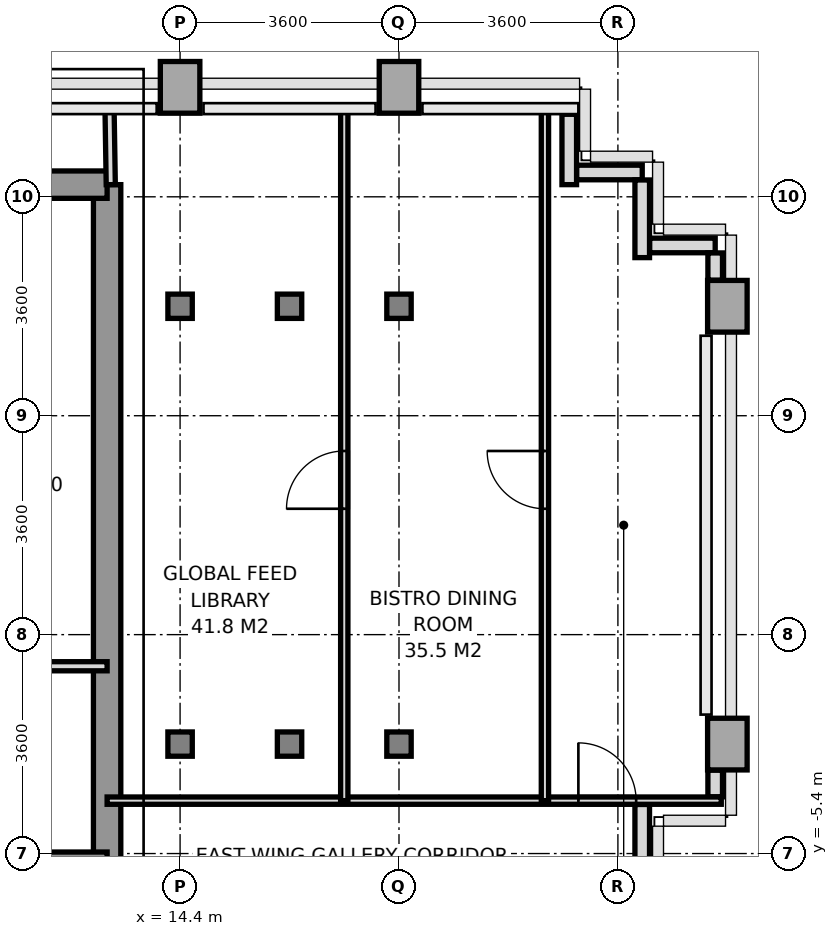
"""IFC4 building model, lengths in metres.
Left out: names, types, materials, properties, quantities, classifications, styles, units other than length and angle.
Written with IfcOpenShell. Run it as: python <this file> out.ifc"""

import sys

from ifc_helpers import new_model, si_unit, direction, frame, frame_2d, origin, origin_2d, place, context, subcontext, project, spatial, rectangle, i_section, extrude, source, transform, mapped, element, fill, save


model = new_model("IFC4")
c1 = context("Model", 3, precision=1e-05, world=origin(), true_north=direction((0.0, 1.0)))
c2 = subcontext(c1, "Body", "Model", "MODEL_VIEW")
j1 = project(units=[si_unit("LENGTHUNIT", "METRE"), si_unit("PLANEANGLEUNIT", "RADIAN")], contexts=[c1])
p1 = place(None, origin())
s1 = spatial("IfcSite", under=j1, at=p1, CompositionType="ELEMENT")
p2 = place(p1, origin())
s2 = spatial("IfcBuilding", under=s1, at=p2, CompositionType="ELEMENT")
p3 = place(p2, frame((0.0, 0.0, 124.4)))
s3 = spatial("IfcBuildingStorey", under=s2, at=p3, CompositionType="ELEMENT", Elevation=124.4)
m1 = source(origin(), c2, "Body", "SweptSolid", [
    extrude(i_section(OverallWidth=0.401, OverallDepth=0.399, WebThickness=0.02, FlangeThickness=0.032, at=origin_2d()), origin(), (0.0, 0.0, 1.0), 3.2),
])
for number, where, z_axis, x_axis in (
    (1, (14.4, -3.6, 0.0), (0.0, 0.0, 1.0), (1.0, 0.0, 0.0)),
    (2, (14.4, 3.6, 0.0), (0.0, 0.0, 1.0), (1.0, 0.0, 0.0)),
):
    element("IfcColumn", number, at=place(p3, frame(where, z_axis=z_axis, x_axis=x_axis)), inside=s3, PredefinedType="COLUMN", context=c2, shape_type="MappedRepresentation", body=[
        mapped(m1, transform((0.0, 0.0, 0.0), x_axis=(1.0, 0.0, 0.0), y_axis=(0.0, 1.0, 0.0), z_axis=(0.0, 0.0, 1.0), scale=1.0)),
    ])
m2 = source(origin(), c2, "Body", "SweptSolid", [
    extrude(rectangle(XDim=0.65, YDim=0.85, at=origin_2d()), origin(), (0.0, 0.0, 1.0), 3.2),
])
p4 = place(p3, frame((14.4, 7.2, 0.0), z_axis=(0.0, 0.0, 1.0), x_axis=(1.0, 0.0, 0.0)))
e3 = element("IfcColumn", 3, at=p4, inside=s3, PredefinedType="COLUMN", context=c2, shape_type="MappedRepresentation", body=[
    mapped(m2, transform((0.0, 0.0, 0.0), x_axis=(1.0, 0.0, 0.0), y_axis=(0.0, 1.0, 0.0), z_axis=(0.0, 0.0, 1.0), scale=1.0)),
])
for number, where, z_axis, x_axis in (
    (4, (16.2, -3.6, 0.0), (0.0, 0.0, 1.0), (1.0, 0.0, 0.0)),
    (5, (16.2, 3.6, 0.0), (0.0, 0.0, 1.0), (1.0, 0.0, 0.0)),
    (6, (18.0, -3.6, 0.0), (0.0, 0.0, 1.0), (1.0, 0.0, 0.0)),
    (7, (18.0, 3.6, 0.0), (0.0, 0.0, 1.0), (1.0, 0.0, 0.0)),
):
    element("IfcColumn", number, at=place(p3, frame(where, z_axis=z_axis, x_axis=x_axis)), inside=s3, PredefinedType="COLUMN", context=c2, shape_type="MappedRepresentation", body=[
        mapped(m1, transform((0.0, 0.0, 0.0), x_axis=(1.0, 0.0, 0.0), y_axis=(0.0, 1.0, 0.0), z_axis=(0.0, 0.0, 1.0), scale=1.0)),
    ])
for number, where, z_axis, x_axis in (
    (8, (18.0, 7.2, 0.0), (0.0, 0.0, 1.0), (1.0, 0.0, 0.0)),
    (9, (23.4, -3.6, 0.0), (0.0, 0.0, 1.0), (1.0, 0.0, 0.0)),
    (10, (23.4, 3.6, 0.0), (0.0, 0.0, 1.0), (1.0, 0.0, 0.0)),
):
    element("IfcColumn", number, at=place(p3, frame(where, z_axis=z_axis, x_axis=x_axis)), inside=s3, PredefinedType="COLUMN", context=c2, shape_type="MappedRepresentation", body=[
        mapped(m2, transform((0.0, 0.0, 0.0), x_axis=(1.0, 0.0, 0.0), y_axis=(0.0, 1.0, 0.0), z_axis=(0.0, 0.0, 1.0), scale=1.0)),
    ])
p5 = place(p3, frame((22.0, -4.593, 0.0), z_axis=(0.0, 0.0, 1.0), x_axis=(0.0, -1.0, 0.0)))
e11 = element("IfcWall", 11, at=p5, inside=s3, PredefinedType="PARAPET", context=c2, shape_type="SweptSolid", body=[
    extrude(rectangle(XDim=1.207, YDim=0.24, at=frame_2d((0.604, 0.0))), origin(), (0.0, 0.0, 1.0), 1.15),
])
p6 = place(p3, frame((20.8, 6.757, 0.0), z_axis=(0.0, 0.0, 1.0), x_axis=(0.0, -1.0, 0.0)))
e12 = element("IfcWall", 12, at=p6, inside=s3, PredefinedType="PARAPET", context=c2, shape_type="SweptSolid", body=[
    extrude(rectangle(XDim=1.157, YDim=0.24, at=frame_2d((0.579, 0.0))), origin(), (0.0, 0.0, 1.0), 1.15),
])
p7 = place(p3, frame((20.923, 5.8, 0.0), z_axis=(0.0, 0.0, 1.0), x_axis=(1.0, 0.0, 0.0)))
e13 = element("IfcWall", 13, at=p7, inside=s3, PredefinedType="PARAPET", context=c2, shape_type="SweptSolid", body=[
    extrude(rectangle(XDim=1.077, YDim=0.24, at=frame_2d((0.539, 0.0))), origin(), (0.0, 0.0, 1.0), 1.15),
])
p8 = place(p3, frame((22.0, 5.677, 0.0), z_axis=(0.0, 0.0, 1.0), x_axis=(0.0, -1.0, 0.0)))
e14 = element("IfcWall", 14, at=p8, inside=s3, PredefinedType="PARAPET", context=c2, shape_type="SweptSolid", body=[
    extrude(rectangle(XDim=1.277, YDim=0.24, at=frame_2d((0.639, 0.0))), origin(), (0.0, 0.0, 1.0), 1.15),
])
p9 = place(p3, frame((22.123, 4.6, 0.0), z_axis=(0.0, 0.0, 1.0), x_axis=(1.0, 0.0, 0.0)))
e15 = element("IfcWall", 15, at=p9, inside=s3, PredefinedType="PARAPET", context=c2, shape_type="SweptSolid", body=[
    extrude(rectangle(XDim=1.077, YDim=0.24, at=frame_2d((0.539, 0.0))), origin(), (0.0, 0.0, 1.0), 1.15),
])
p10 = place(p3, frame((23.2, 4.477, 0.0), z_axis=(0.0, 0.0, 1.0), x_axis=(0.0, -1.0, 0.0)))
e16 = element("IfcWall", 16, at=p10, inside=s3, PredefinedType="PARAPET", context=c2, shape_type="SweptSolid", body=[
    extrude(rectangle(XDim=0.449, YDim=0.24, at=frame_2d((0.225, 0.0))), origin(), (0.0, 0.0, 1.0), 1.15),
])
p11 = place(p3, frame((23.2, -4.028, 0.0), z_axis=(0.0, 0.0, 1.0), x_axis=(0.0, -1.0, 0.0)))
e17 = element("IfcWall", 17, at=p11, inside=s3, PredefinedType="PARAPET", context=c2, shape_type="SweptSolid", body=[
    extrude(rectangle(XDim=0.439, YDim=0.24, at=frame_2d((0.219, 0.0))), origin(), (0.0, 0.0, 1.0), 1.15),
])
p12 = place(p3, frame((13.2, -5.6, 0.0), z_axis=(0.0, 0.0, 1.0), x_axis=(0.0, 1.0, 0.0)))
e18 = element("IfcWall", 18, at=p12, inside=s3, PredefinedType="SHEAR", context=c2, shape_type="SweptSolid", body=[
    extrude(rectangle(XDim=11.2, YDim=0.45, at=frame_2d((5.6, 0.0))), origin(), (0.0, 0.0, 1.0), 3.2),
])
p13 = place(p3, frame((11.381, 5.6, 0.0), z_axis=(0.0, 0.0, 1.0), x_axis=(1.0, 0.0, 0.0)))
e19 = element("IfcWall", 19, at=p13, inside=s3, PredefinedType="SHEAR", context=c2, shape_type="SweptSolid", body=[
    extrude(rectangle(XDim=1.819, YDim=0.45, at=frame_2d((0.909, 0.0))), origin(), (0.0, 0.0, 1.0), 3.2),
])
p14 = place(p3, frame((5.4, -5.6, 0.0), z_axis=(0.0, 0.0, 1.0), x_axis=(1.0, 0.0, 0.0)))
e20 = element("IfcWall", 20, at=p14, inside=s3, PredefinedType="SHEAR", context=c2, shape_type="SweptSolid", body=[
    extrude(rectangle(XDim=7.8, YDim=0.45, at=frame_2d((3.9, 0.0))), origin(), (0.0, 0.0, 1.0), 3.2),
])
p15 = place(p14, frame((3.0, 0.0, 0.0)))
e21 = element("IfcOpeningElement", 21, at=p15, cuts=e20, PredefinedType="OPENING", context=c2, shape_type="SweptSolid", body=[
    extrude(rectangle(XDim=1.2, YDim=2.2, at=frame_2d((0.6, 1.1))), frame((0.0, 0.235, 0.0), z_axis=(0.0, -1.0, 0.0), x_axis=(1.0, 0.0, 0.0)), (0.0, 0.0, 1.0), 0.47),
])
p16 = place(p14, frame((5.85, 0.0, 0.0)))
e22 = element("IfcOpeningElement", 22, at=p16, cuts=e20, PredefinedType="OPENING", context=c2, shape_type="SweptSolid", body=[
    extrude(rectangle(XDim=0.8, YDim=2.1, at=frame_2d((0.4, 1.05))), frame((0.0, 0.235, 0.0), z_axis=(0.0, -1.0, 0.0), x_axis=(1.0, 0.0, 0.0)), (0.0, 0.0, 1.0), 0.47),
])
p17 = place(p3, frame((11.02, -2.32, 0.0), z_axis=(0.0, 0.0, 1.0), x_axis=(1.0, 0.0, 0.0)))
e23 = element("IfcWall", 23, at=p17, inside=s3, PredefinedType="PARTITIONING", context=c2, shape_type="SweptSolid", body=[
    extrude(rectangle(XDim=2.18, YDim=0.15, at=frame_2d((1.09, 0.0))), origin(), (0.0, 0.0, 1.0), 3.2),
])
p18 = place(p3, frame((13.26, 5.6, 0.0), z_axis=(0.0, 0.0, 1.0), x_axis=(-0.016013571389, 0.999871774545, 0.0)))
e24 = element("IfcWall", 24, at=p18, inside=s3, PredefinedType="PARTITIONING", context=c2, shape_type="SweptSolid", body=[
    extrude(rectangle(XDim=1.25, YDim=0.15, at=frame_2d((0.625, 0.0))), origin(), (0.0, 0.0, 1.0), 3.2),
])
p19 = place(p3, frame((13.2, -4.53, 0.0), z_axis=(0.0, 0.0, 1.0), x_axis=(1.0, 0.0, 0.0)))
e25 = element("IfcWall", 25, at=p19, inside=s3, PredefinedType="PARTITIONING", context=c2, shape_type="SweptSolid", body=[
    extrude(rectangle(XDim=10.1, YDim=0.12, at=frame_2d((5.05, 0.0))), origin(), (0.0, 0.0, 1.0), 2.76),
])
p20 = place(p19, frame((7.75, 0.0, 0.0)))
e26 = element("IfcOpeningElement", 26, at=p20, cuts=e25, PredefinedType="OPENING", context=c2, shape_type="SweptSolid", body=[
    extrude(rectangle(XDim=0.95, YDim=2.15, at=frame_2d((0.475, 1.075))), frame((0.0, 0.07, 0.0), z_axis=(0.0, -1.0, 0.0), x_axis=(1.0, 0.0, 0.0)), (0.0, 0.0, 1.0), 0.14),
])
p21 = place(p3, frame((17.1, -4.53, 0.0), z_axis=(0.0, 0.0, 1.0), x_axis=(0.0, 1.0, 0.0)))
e27 = element("IfcWall", 27, at=p21, inside=s3, PredefinedType="PARTITIONING", context=c2, shape_type="SweptSolid", body=[
    extrude(rectangle(XDim=11.38, YDim=0.12, at=frame_2d((5.69, 0.0))), origin(), (0.0, 0.0, 1.0), 2.7),
])
p22 = place(p21, frame((4.8, 0.0, 0.0)))
e28 = element("IfcOpeningElement", 28, at=p22, cuts=e27, PredefinedType="OPENING", context=c2, shape_type="SweptSolid", body=[
    extrude(rectangle(XDim=0.95, YDim=2.15, at=frame_2d((0.475, 1.075))), frame((0.0, 0.07, 0.0), z_axis=(0.0, -1.0, 0.0), x_axis=(1.0, 0.0, 0.0)), (0.0, 0.0, 1.0), 0.14),
])
p23 = place(p3, frame((20.4, -4.53, 0.0), z_axis=(0.0, 0.0, 1.0), x_axis=(0.0, 1.0, 0.0)))
e29 = element("IfcWall", 29, at=p23, inside=s3, PredefinedType="PARTITIONING", context=c2, shape_type="SweptSolid", body=[
    extrude(rectangle(XDim=11.38, YDim=0.12, at=frame_2d((5.69, 0.0))), origin(), (0.0, 0.0, 1.0), 2.7),
])
p24 = place(p23, frame((4.8, 0.0, 0.0)))
e30 = element("IfcOpeningElement", 30, at=p24, cuts=e29, PredefinedType="OPENING", context=c2, shape_type="SweptSolid", body=[
    extrude(rectangle(XDim=0.95, YDim=2.15, at=frame_2d((0.475, 1.075))), frame((0.0, 0.07, 0.0), z_axis=(0.0, -1.0, 0.0), x_axis=(1.0, 0.0, 0.0)), (0.0, 0.0, 1.0), 0.14),
])
m3 = source(origin(), c2, "Body", "SweptSolid", [
    extrude(rectangle(XDim=0.95, YDim=2.15, at=frame_2d((0.475, 1.075))), frame((0.0, 0.025, 0.0), z_axis=(0.0, -1.0, 0.0), x_axis=(1.0, 0.0, 0.0)), (0.0, 0.0, 1.0), 0.05),
])
p25 = place(p22, origin())
e31 = element("IfcDoor", 31, at=p25, inside=s3, OperationType="SINGLE_SWING_LEFT", PredefinedType="DOOR", context=c2, shape_type="MappedRepresentation", body=[
    mapped(m3, transform((0.0, 0.0, 0.0), x_axis=(1.0, 0.0, 0.0), y_axis=(0.0, 1.0, 0.0), z_axis=(0.0, 0.0, 1.0), scale=1.0)),
])
fill(e28, e31)
p26 = place(p24, origin())
e32 = element("IfcDoor", 32, at=p26, inside=s3, OperationType="SINGLE_SWING_RIGHT", PredefinedType="DOOR", context=c2, shape_type="MappedRepresentation", body=[
    mapped(m3, transform((0.0, 0.0, 0.0), x_axis=(1.0, 0.0, 0.0), y_axis=(0.0, 1.0, 0.0), z_axis=(0.0, 0.0, 1.0), scale=1.0)),
])
fill(e30, e32)
p27 = place(p20, origin())
e33 = element("IfcDoor", 33, at=p27, inside=s3, OperationType="SINGLE_SWING_LEFT", PredefinedType="DOOR", context=c2, shape_type="MappedRepresentation", body=[
    mapped(m3, transform((0.0, 0.0, 0.0), x_axis=(1.0, 0.0, 0.0), y_axis=(0.0, 1.0, 0.0), z_axis=(0.0, 0.0, 1.0), scale=1.0)),
])
fill(e26, e33)
save(model, sys.argv[1])
